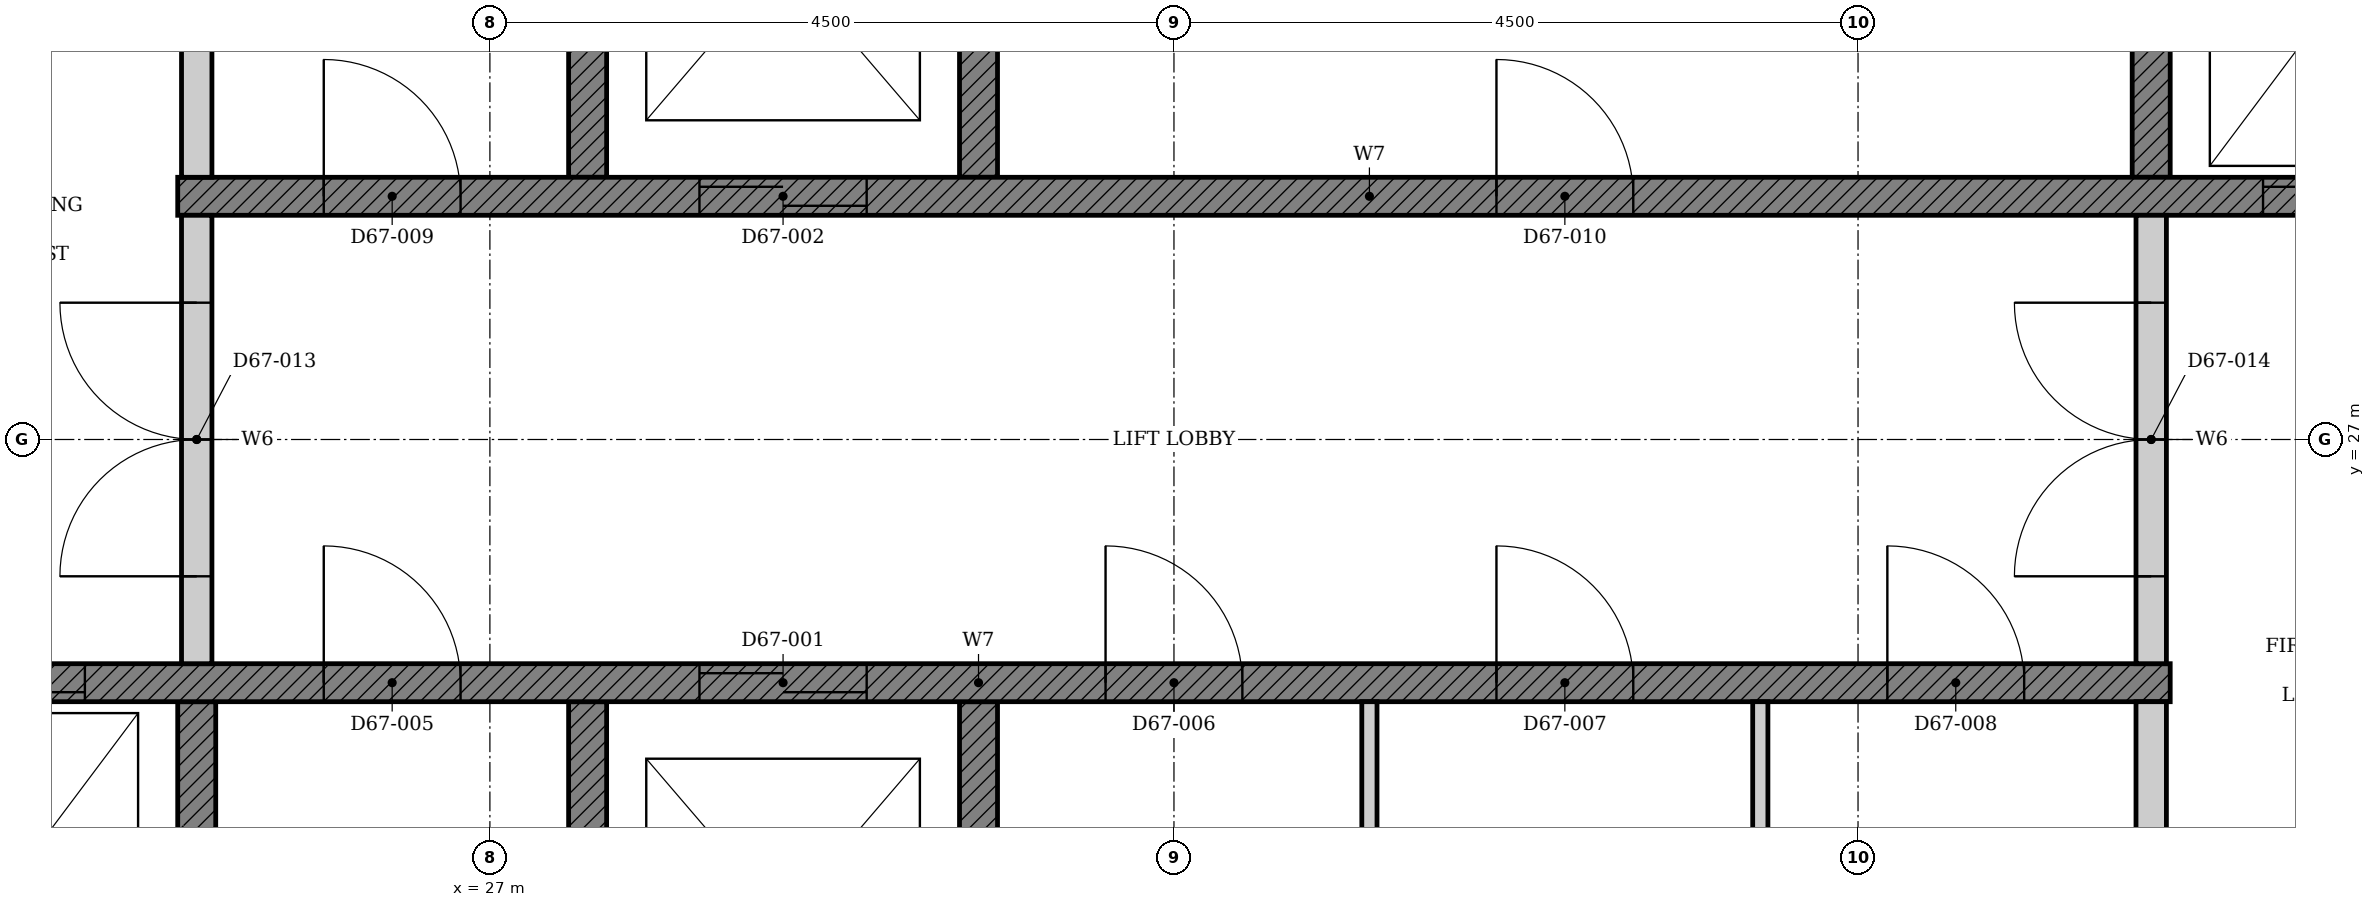
"""IFC4 building model, lengths in metres.
Left out: names, types, materials, properties, quantities, classifications, styles, units other than length and angle.
Written with IfcOpenShell. Run it as: python <this file> out.ifc"""

import sys

from ifc_helpers import new_model, si_unit, direction, frame, frame_2d, origin, place, context, subcontext, project, spatial, polyline, rectangle, outline, extrude, element, fill, save


model = new_model("IFC4")
c1 = context("Model", 3, precision=1e-05, world=origin(), true_north=direction((0.0, 1.0)))
c2 = subcontext(c1, "Body", "Model", "MODEL_VIEW")
j1 = project(units=[si_unit("LENGTHUNIT", "METRE"), si_unit("PLANEANGLEUNIT", "RADIAN")], contexts=[c1])
p1 = place(None, origin())
s1 = spatial("IfcSite", under=j1, at=p1, CompositionType="ELEMENT")
p2 = place(p1, origin())
s2 = spatial("IfcBuilding", under=s1, at=p2, CompositionType="ELEMENT")
p3 = place(p2, frame((0.0, 0.0, 263.8)))
s3 = spatial("IfcBuildingStorey", under=s2, at=p3, CompositionType="ELEMENT", Elevation=263.8)
p4 = place(p3, origin())
e1 = element("IfcWall", 1, at=p4, inside=s3, PredefinedType="SHEAR", context=c2, shape_type="SweptSolid", body=[
    extrude(outline(polyline([(22.375, 22.35), (25.197, 22.35), (25.197, 25.275), (24.947, 25.275), (24.947, 22.65), (22.625, 22.65), (22.625, 25.275), (22.375, 25.275), (22.375, 22.35)])), origin(), (0.0, 0.0, 1.0), 3.4),
])
p5 = place(p3, origin())
e2 = element("IfcWall", 2, at=p5, inside=s3, PredefinedType="SHEAR", context=c2, shape_type="SweptSolid", body=[
    extrude(outline(polyline([(27.518, 22.35), (30.339, 22.35), (30.339, 25.275), (30.089, 25.275), (30.089, 22.65), (27.768, 22.65), (27.768, 25.275), (27.518, 25.275), (27.518, 22.35)])), origin(), (0.0, 0.0, 1.0), 3.4),
])
p6 = place(p3, origin())
e3 = element("IfcWall", 3, at=p6, inside=s3, PredefinedType="SHEAR", context=c2, shape_type="SweptSolid", body=[
    extrude(outline(polyline([(27.518, 28.725), (27.768, 28.725), (27.768, 31.35), (30.089, 31.35), (30.089, 28.725), (30.339, 28.725), (30.339, 31.65), (27.518, 31.65), (27.518, 28.725)])), origin(), (0.0, 0.0, 1.0), 3.4),
])
p7 = place(p3, origin())
e4 = element("IfcWall", 4, at=p7, inside=s3, PredefinedType="SHEAR", context=c2, shape_type="SweptSolid", body=[
    extrude(outline(polyline([(37.803, 28.725), (38.053, 28.725), (38.053, 31.35), (40.375, 31.35), (40.375, 28.725), (40.625, 28.725), (40.625, 31.65), (37.803, 31.65), (37.803, 28.725)])), origin(), (0.0, 0.0, 1.0), 3.4),
])
p8 = place(p3, frame((22.375, 25.4, 0.0), z_axis=(0.0, 0.0, 1.0), x_axis=(1.0, 0.0, 0.0)))
e5 = element("IfcWall", 5, at=p8, inside=s3, PredefinedType="SHEAR", context=c2, shape_type="SweptSolid", body=[
    extrude(rectangle(XDim=15.678, YDim=0.25, at=frame_2d((7.839, 0.0))), origin(), (0.0, 0.0, 1.0), 3.4),
])
p9 = place(p8, frame((6.004, 0.0, 0.0)))
e6 = element("IfcOpeningElement", 6, at=p9, cuts=e5, PredefinedType="OPENING", context=c2, shape_type="SweptSolid", body=[
    extrude(rectangle(XDim=1.1, YDim=2.1, at=frame_2d((0.55, 1.05))), frame((0.0, 0.135, 0.0), z_axis=(0.0, -1.0, 0.0), x_axis=(1.0, 0.0, 0.0)), (0.0, 0.0, 1.0), 0.27),
])
p10 = place(p8, frame((0.861, 0.0, 0.0)))
e7 = element("IfcOpeningElement", 7, at=p10, cuts=e5, PredefinedType="OPENING", context=c2, shape_type="SweptSolid", body=[
    extrude(rectangle(XDim=1.1, YDim=2.1, at=frame_2d((0.55, 1.05))), frame((0.0, 0.135, 0.0), z_axis=(0.0, -1.0, 0.0), x_axis=(1.0, 0.0, 0.0)), (0.0, 0.0, 1.0), 0.27),
])
p11 = place(p8, frame((3.532, 0.0, 0.0)))
e8 = element("IfcOpeningElement", 8, at=p11, cuts=e5, PredefinedType="OPENING", context=c2, shape_type="SweptSolid", body=[
    extrude(rectangle(XDim=0.9, YDim=2.1, at=frame_2d((0.45, 1.05))), frame((0.0, 0.135, 0.0), z_axis=(0.0, -1.0, 0.0), x_axis=(1.0, 0.0, 0.0)), (0.0, 0.0, 1.0), 0.27),
])
p12 = place(p8, frame((8.675, 0.0, 0.0)))
e9 = element("IfcOpeningElement", 9, at=p12, cuts=e5, PredefinedType="OPENING", context=c2, shape_type="SweptSolid", body=[
    extrude(rectangle(XDim=0.9, YDim=2.1, at=frame_2d((0.45, 1.05))), frame((0.0, 0.135, 0.0), z_axis=(0.0, -1.0, 0.0), x_axis=(1.0, 0.0, 0.0)), (0.0, 0.0, 1.0), 0.27),
])
p13 = place(p8, frame((11.246, 0.0, 0.0)))
e10 = element("IfcOpeningElement", 10, at=p13, cuts=e5, PredefinedType="OPENING", context=c2, shape_type="SweptSolid", body=[
    extrude(rectangle(XDim=0.9, YDim=2.1, at=frame_2d((0.45, 1.05))), frame((0.0, 0.135, 0.0), z_axis=(0.0, -1.0, 0.0), x_axis=(1.0, 0.0, 0.0)), (0.0, 0.0, 1.0), 0.27),
])
p14 = place(p8, frame((13.818, 0.0, 0.0)))
e11 = element("IfcOpeningElement", 11, at=p14, cuts=e5, PredefinedType="OPENING", context=c2, shape_type="SweptSolid", body=[
    extrude(rectangle(XDim=0.9, YDim=2.1, at=frame_2d((0.45, 1.05))), frame((0.0, 0.135, 0.0), z_axis=(0.0, -1.0, 0.0), x_axis=(1.0, 0.0, 0.0)), (0.0, 0.0, 1.0), 0.27),
])
p15 = place(p3, frame((24.947, 28.6, 0.0), z_axis=(0.0, 0.0, 1.0), x_axis=(1.0, 0.0, 0.0)))
e12 = element("IfcWall", 12, at=p15, inside=s3, PredefinedType="SHEAR", context=c2, shape_type="SweptSolid", body=[
    extrude(rectangle(XDim=15.678, YDim=0.25, at=frame_2d((7.839, 0.0))), origin(), (0.0, 0.0, 1.0), 3.4),
])
p16 = place(p15, frame((3.432, 0.0, 0.0)))
e13 = element("IfcOpeningElement", 13, at=p16, cuts=e12, PredefinedType="OPENING", context=c2, shape_type="SweptSolid", body=[
    extrude(rectangle(XDim=1.1, YDim=2.1, at=frame_2d((0.55, 1.05))), frame((0.0, 0.135, 0.0), z_axis=(0.0, -1.0, 0.0), x_axis=(1.0, 0.0, 0.0)), (0.0, 0.0, 1.0), 0.27),
])
p17 = place(p15, frame((13.718, 0.0, 0.0)))
e14 = element("IfcOpeningElement", 14, at=p17, cuts=e12, PredefinedType="OPENING", context=c2, shape_type="SweptSolid", body=[
    extrude(rectangle(XDim=1.1, YDim=2.1, at=frame_2d((0.55, 1.05))), frame((0.0, 0.135, 0.0), z_axis=(0.0, -1.0, 0.0), x_axis=(1.0, 0.0, 0.0)), (0.0, 0.0, 1.0), 0.27),
])
p18 = place(p15, frame((0.961, 0.0, 0.0)))
e15 = element("IfcOpeningElement", 15, at=p18, cuts=e12, PredefinedType="OPENING", context=c2, shape_type="SweptSolid", body=[
    extrude(rectangle(XDim=0.9, YDim=2.1, at=frame_2d((0.45, 1.05))), frame((0.0, 0.135, 0.0), z_axis=(0.0, -1.0, 0.0), x_axis=(1.0, 0.0, 0.0)), (0.0, 0.0, 1.0), 0.27),
])
p19 = place(p15, frame((8.675, 0.0, 0.0)))
e16 = element("IfcOpeningElement", 16, at=p19, cuts=e12, PredefinedType="OPENING", context=c2, shape_type="SweptSolid", body=[
    extrude(rectangle(XDim=0.9, YDim=2.1, at=frame_2d((0.45, 1.05))), frame((0.0, 0.135, 0.0), z_axis=(0.0, -1.0, 0.0), x_axis=(1.0, 0.0, 0.0)), (0.0, 0.0, 1.0), 0.27),
])
p20 = place(p3, frame((37.928, 22.65, 0.0), z_axis=(0.0, 0.0, 1.0), x_axis=(0.0, 1.0, 0.0)))
e17 = element("IfcWall", 17, at=p20, inside=s3, PredefinedType="PARTITIONING", context=c2, shape_type="SweptSolid", body=[
    extrude(rectangle(XDim=2.625, YDim=0.2, at=frame_2d((1.312, 0.0))), origin(), (0.0, 0.0, 1.0), 3.4),
])
for number, where, z_axis, x_axis in (
    (18, (32.786, 22.65, 0.0), (0.0, 0.0, 1.0), (0.0, 1.0, 0.0)),
    (19, (35.357, 22.65, 0.0), (0.0, 0.0, 1.0), (0.0, 1.0, 0.0)),
):
    element("IfcWall", number, at=place(p3, frame(where, z_axis=z_axis, x_axis=x_axis)), inside=s3, PredefinedType="PARTITIONING", context=c2, shape_type="SweptSolid", body=[
        extrude(rectangle(XDim=2.625, YDim=0.1, at=frame_2d((1.312, 0.0))), origin(), (0.0, 0.0, 1.0), 3.4),
    ])
p21 = place(p3, frame((25.072, 28.725, 0.0), z_axis=(0.0, 0.0, 1.0), x_axis=(0.0, 1.0, 0.0)))
e20 = element("IfcWall", 20, at=p21, inside=s3, PredefinedType="PARTITIONING", context=c2, shape_type="SweptSolid", body=[
    extrude(rectangle(XDim=2.625, YDim=0.2, at=frame_2d((1.312, 0.0))), origin(), (0.0, 0.0, 1.0), 3.4),
])
p22 = place(p3, frame((25.072, 25.525, 0.0), z_axis=(0.0, 0.0, 1.0), x_axis=(0.0, 1.0, 0.0)))
e21 = element("IfcWall", 21, at=p22, inside=s3, PredefinedType="PARTITIONING", context=c2, shape_type="SweptSolid", body=[
    extrude(rectangle(XDim=2.95, YDim=0.2, at=frame_2d((1.475, 0.0))), origin(), (0.0, 0.0, 1.0), 3.4),
])
p23 = place(p22, frame((0.575, 0.0, 0.0)))
e22 = element("IfcOpeningElement", 22, at=p23, cuts=e21, PredefinedType="OPENING", context=c2, shape_type="SweptSolid", body=[
    extrude(rectangle(XDim=1.8, YDim=2.1, at=frame_2d((0.9, 1.05))), frame((0.0, 0.11, 0.0), z_axis=(0.0, -1.0, 0.0), x_axis=(1.0, 0.0, 0.0)), (0.0, 0.0, 1.0), 0.22),
])
p24 = place(p3, frame((37.928, 25.525, 0.0), z_axis=(0.0, 0.0, 1.0), x_axis=(0.0, 1.0, 0.0)))
e23 = element("IfcWall", 23, at=p24, inside=s3, PredefinedType="PARTITIONING", context=c2, shape_type="SweptSolid", body=[
    extrude(rectangle(XDim=2.95, YDim=0.2, at=frame_2d((1.475, 0.0))), origin(), (0.0, 0.0, 1.0), 3.4),
])
p25 = place(p24, frame((0.575, 0.0, 0.0)))
e24 = element("IfcOpeningElement", 24, at=p25, cuts=e23, PredefinedType="OPENING", context=c2, shape_type="SweptSolid", body=[
    extrude(rectangle(XDim=1.8, YDim=2.1, at=frame_2d((0.9, 1.05))), frame((0.0, 0.11, 0.0), z_axis=(0.0, -1.0, 0.0), x_axis=(1.0, 0.0, 0.0)), (0.0, 0.0, 1.0), 0.22),
])
p26 = place(p9, origin())
e25 = element("IfcDoor", 25, at=p26, inside=s3, OperationType="DOUBLE_DOOR_SLIDING", PredefinedType="DOOR", context=c2, shape_type="SweptSolid", body=[
    extrude(rectangle(XDim=1.1, YDim=2.1, at=frame_2d((0.55, 1.05))), frame((0.0, 0.025, 0.0), z_axis=(0.0, -1.0, 0.0), x_axis=(1.0, 0.0, 0.0)), (0.0, 0.0, 1.0), 0.05),
])
fill(e6, e25)
p27 = place(p16, origin())
e26 = element("IfcDoor", 26, at=p27, inside=s3, OperationType="DOUBLE_DOOR_SLIDING", PredefinedType="DOOR", context=c2, shape_type="SweptSolid", body=[
    extrude(rectangle(XDim=1.1, YDim=2.1, at=frame_2d((0.55, 1.05))), frame((0.0, 0.025, 0.0), z_axis=(0.0, -1.0, 0.0), x_axis=(1.0, 0.0, 0.0)), (0.0, 0.0, 1.0), 0.05),
])
fill(e13, e26)
p28 = place(p10, origin())
e27 = element("IfcDoor", 27, at=p28, inside=s3, OperationType="DOUBLE_DOOR_SLIDING", PredefinedType="DOOR", context=c2, shape_type="SweptSolid", body=[
    extrude(rectangle(XDim=1.1, YDim=2.1, at=frame_2d((0.55, 1.05))), frame((0.0, 0.025, 0.0), z_axis=(0.0, -1.0, 0.0), x_axis=(1.0, 0.0, 0.0)), (0.0, 0.0, 1.0), 0.05),
])
fill(e7, e27)
p29 = place(p17, origin())
e28 = element("IfcDoor", 28, at=p29, inside=s3, OperationType="DOUBLE_DOOR_SLIDING", PredefinedType="DOOR", context=c2, shape_type="SweptSolid", body=[
    extrude(rectangle(XDim=1.1, YDim=2.1, at=frame_2d((0.55, 1.05))), frame((0.0, 0.025, 0.0), z_axis=(0.0, -1.0, 0.0), x_axis=(1.0, 0.0, 0.0)), (0.0, 0.0, 1.0), 0.05),
])
fill(e14, e28)
p30 = place(p11, origin())
e29 = element("IfcDoor", 29, at=p30, inside=s3, OperationType="SINGLE_SWING_LEFT", PredefinedType="DOOR", context=c2, shape_type="SweptSolid", body=[
    extrude(rectangle(XDim=0.9, YDim=2.1, at=frame_2d((0.45, 1.05))), frame((0.0, 0.025, 0.0), z_axis=(0.0, -1.0, 0.0), x_axis=(1.0, 0.0, 0.0)), (0.0, 0.0, 1.0), 0.05),
])
fill(e8, e29)
p31 = place(p12, origin())
e30 = element("IfcDoor", 30, at=p31, inside=s3, OperationType="SINGLE_SWING_LEFT", PredefinedType="DOOR", context=c2, shape_type="SweptSolid", body=[
    extrude(rectangle(XDim=0.9, YDim=2.1, at=frame_2d((0.45, 1.05))), frame((0.0, 0.025, 0.0), z_axis=(0.0, -1.0, 0.0), x_axis=(1.0, 0.0, 0.0)), (0.0, 0.0, 1.0), 0.05),
])
fill(e9, e30)
p32 = place(p13, origin())
e31 = element("IfcDoor", 31, at=p32, inside=s3, OperationType="SINGLE_SWING_LEFT", PredefinedType="DOOR", context=c2, shape_type="SweptSolid", body=[
    extrude(rectangle(XDim=0.9, YDim=2.1, at=frame_2d((0.45, 1.05))), frame((0.0, 0.025, 0.0), z_axis=(0.0, -1.0, 0.0), x_axis=(1.0, 0.0, 0.0)), (0.0, 0.0, 1.0), 0.05),
])
fill(e10, e31)
p33 = place(p14, origin())
e32 = element("IfcDoor", 32, at=p33, inside=s3, OperationType="SINGLE_SWING_LEFT", PredefinedType="DOOR", context=c2, shape_type="SweptSolid", body=[
    extrude(rectangle(XDim=0.9, YDim=2.1, at=frame_2d((0.45, 1.05))), frame((0.0, 0.025, 0.0), z_axis=(0.0, -1.0, 0.0), x_axis=(1.0, 0.0, 0.0)), (0.0, 0.0, 1.0), 0.05),
])
fill(e11, e32)
p34 = place(p18, origin())
e33 = element("IfcDoor", 33, at=p34, inside=s3, OperationType="SINGLE_SWING_LEFT", PredefinedType="DOOR", context=c2, shape_type="SweptSolid", body=[
    extrude(rectangle(XDim=0.9, YDim=2.1, at=frame_2d((0.45, 1.05))), frame((0.0, 0.025, 0.0), z_axis=(0.0, -1.0, 0.0), x_axis=(1.0, 0.0, 0.0)), (0.0, 0.0, 1.0), 0.05),
])
fill(e15, e33)
p35 = place(p19, origin())
e34 = element("IfcDoor", 34, at=p35, inside=s3, OperationType="SINGLE_SWING_LEFT", PredefinedType="DOOR", context=c2, shape_type="SweptSolid", body=[
    extrude(rectangle(XDim=0.9, YDim=2.1, at=frame_2d((0.45, 1.05))), frame((0.0, 0.025, 0.0), z_axis=(0.0, -1.0, 0.0), x_axis=(1.0, 0.0, 0.0)), (0.0, 0.0, 1.0), 0.05),
])
fill(e16, e34)
p36 = place(p23, origin())
e35 = element("IfcDoor", 35, at=p36, inside=s3, OperationType="DOUBLE_DOOR_SINGLE_SWING", PredefinedType="DOOR", context=c2, shape_type="SweptSolid", body=[
    extrude(rectangle(XDim=1.8, YDim=2.1, at=frame_2d((0.9, 1.05))), frame((0.0, 0.025, 0.0), z_axis=(0.0, -1.0, 0.0), x_axis=(1.0, 0.0, 0.0)), (0.0, 0.0, 1.0), 0.05),
])
fill(e22, e35)
p37 = place(p25, origin())
e36 = element("IfcDoor", 36, at=p37, inside=s3, OperationType="DOUBLE_DOOR_SINGLE_SWING", PredefinedType="DOOR", context=c2, shape_type="SweptSolid", body=[
    extrude(rectangle(XDim=1.8, YDim=2.1, at=frame_2d((0.9, 1.05))), frame((0.0, 0.025, 0.0), z_axis=(0.0, -1.0, 0.0), x_axis=(1.0, 0.0, 0.0)), (0.0, 0.0, 1.0), 0.05),
])
fill(e24, e36)
save(model, sys.argv[1])
